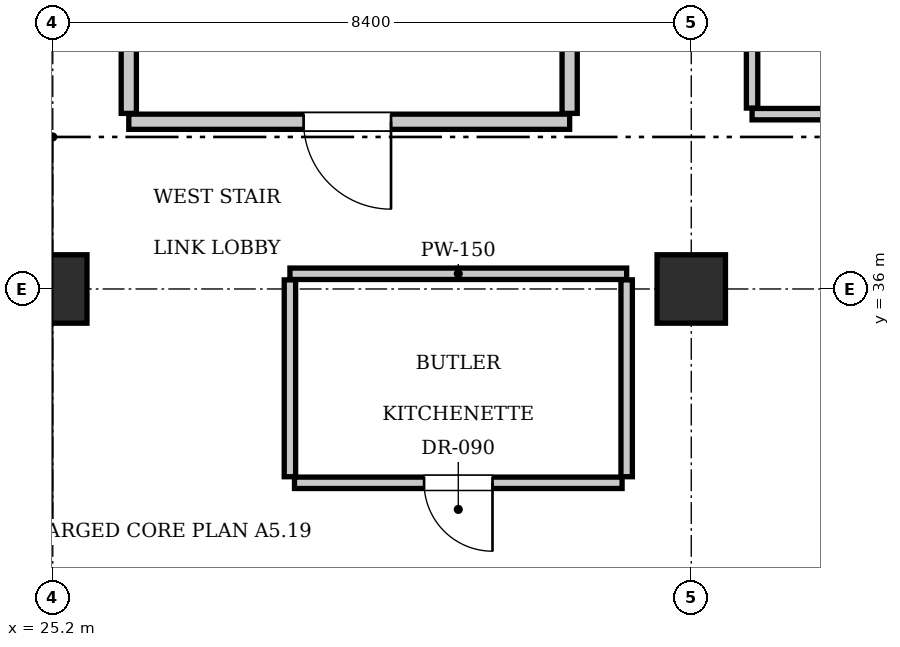
"""IFC4 building model, lengths in metres.
Left out: names, types, materials, properties, quantities, classifications, styles, units other than length and angle.
Written with IfcOpenShell. Run it as: python <this file> out.ifc"""

import sys

from ifc_helpers import new_model, si_unit, direction, frame, frame_2d, origin, origin_2d, place, context, subcontext, project, spatial, rectangle, extrude, element, fill, save


model = new_model("IFC4")
c1 = context("Model", 3, precision=1e-05, world=origin(), true_north=direction((0.0, 1.0)))
c2 = subcontext(c1, "Body", "Model", "MODEL_VIEW")
j1 = project(units=[si_unit("LENGTHUNIT", "METRE"), si_unit("PLANEANGLEUNIT", "RADIAN")], contexts=[c1])
p1 = place(None, origin())
s1 = spatial("IfcSite", under=j1, at=p1, CompositionType="ELEMENT")
p2 = place(p1, origin())
s2 = spatial("IfcBuilding", under=s1, at=p2, CompositionType="ELEMENT")
p3 = place(p2, frame((0.0, 0.0, 135.1)))
s3 = spatial("IfcBuildingStorey", under=s2, at=p3, CompositionType="ELEMENT", Elevation=135.1)
for number, where, z_axis, x_axis in (
    (1, (25.2, 36.0, 0.0), (0.0, 0.0, 1.0), (1.0, 0.0, 0.0)),
    (2, (33.6, 36.0, 0.0), (0.0, 0.0, 1.0), (1.0, 0.0, 0.0)),
):
    element("IfcColumn", number, at=place(p3, frame(where, z_axis=z_axis, x_axis=x_axis)), inside=s3, PredefinedType="COLUMN", context=c2, shape_type="SweptSolid", body=[
        extrude(rectangle(XDim=0.9, YDim=0.9, at=origin_2d()), origin(), (0.0, 0.0, 1.0), 3.85),
    ])
p4 = place(p3, frame((26.2, 38.2, 0.0), z_axis=(0.0, 0.0, 1.0), x_axis=(1.0, 0.0, 0.0)))
e3 = element("IfcWall", 3, at=p4, inside=s3, PredefinedType="PARTITIONING", context=c2, shape_type="SweptSolid", body=[
    extrude(rectangle(XDim=5.8, YDim=0.2, at=frame_2d((2.9, 0.0))), origin(), (0.0, 0.0, 1.0), 3.61),
])
p5 = place(p4, frame((2.3, 0.0, 0.0)))
e4 = element("IfcOpeningElement", 4, at=p5, cuts=e3, PredefinedType="OPENING", context=c2, shape_type="SweptSolid", body=[
    extrude(rectangle(XDim=1.15, YDim=2.15, at=frame_2d((0.575, 1.075))), frame((0.0, 0.11, 0.0), z_axis=(0.0, -1.0, 0.0), x_axis=(1.0, 0.0, 0.0)), (0.0, 0.0, 1.0), 0.22),
])
for number, where, z_axis, x_axis in (
    (5, (26.2, 38.31, 0.0), (0.0, 0.0, 1.0), (0.0, 1.0, 0.0)),
    (6, (32.0, 38.31, 0.0), (0.0, 0.0, 1.0), (0.0, 1.0, 0.0)),
):
    element("IfcWall", number, at=place(p3, frame(where, z_axis=z_axis, x_axis=x_axis)), inside=s3, PredefinedType="PARTITIONING", context=c2, shape_type="SweptSolid", body=[
        extrude(rectangle(XDim=3.07, YDim=0.2, at=frame_2d((1.535, 0.0))), origin(), (0.0, 0.0, 1.0), 3.61),
    ])
p6 = place(p3, frame((34.4, 38.3, 0.0), z_axis=(0.0, 0.0, 1.0), x_axis=(1.0, 0.0, 0.0)))
e7 = element("IfcWall", 7, at=p6, inside=s3, PredefinedType="PARTITIONING", context=c2, shape_type="SweptSolid", body=[
    extrude(rectangle(XDim=2.88, YDim=0.15, at=frame_2d((1.44, 0.0))), origin(), (0.0, 0.0, 1.0), 3.61),
])
p7 = place(p6, frame((1.0, 0.0, 0.0)))
e8 = element("IfcOpeningElement", 8, at=p7, cuts=e7, PredefinedType="OPENING", context=c2, shape_type="SweptSolid", body=[
    extrude(rectangle(XDim=0.8, YDim=2.05, at=frame_2d((0.4, 1.025))), frame((0.0, 0.085, 0.0), z_axis=(0.0, -1.0, 0.0), x_axis=(1.0, 0.0, 0.0)), (0.0, 0.0, 1.0), 0.17),
])
p8 = place(p3, frame((34.4, 38.38, 0.0), z_axis=(0.0, 0.0, 1.0), x_axis=(0.0, 1.0, 0.0)))
e9 = element("IfcWall", 9, at=p8, inside=s3, PredefinedType="PARTITIONING", context=c2, shape_type="SweptSolid", body=[
    extrude(rectangle(XDim=2.84, YDim=0.15, at=frame_2d((1.42, 0.0))), origin(), (0.0, 0.0, 1.0), 3.61),
])
p9 = place(p3, frame((28.32, 36.2, 0.0), z_axis=(0.0, 0.0, 1.0), x_axis=(1.0, 0.0, 0.0)))
e10 = element("IfcWall", 10, at=p9, inside=s3, PredefinedType="PARTITIONING", context=c2, shape_type="SweptSolid", body=[
    extrude(rectangle(XDim=4.43, YDim=0.15, at=frame_2d((2.215, 0.0))), origin(), (0.0, 0.0, 1.0), 3.61),
])
for number, where, z_axis, x_axis in (
    (11, (28.32, 33.53, 0.0), (0.0, 0.0, 1.0), (0.0, 1.0, 0.0)),
    (12, (32.75, 33.53, 0.0), (0.0, 0.0, 1.0), (0.0, 1.0, 0.0)),
):
    element("IfcWall", number, at=place(p3, frame(where, z_axis=z_axis, x_axis=x_axis)), inside=s3, PredefinedType="PARTITIONING", context=c2, shape_type="SweptSolid", body=[
        extrude(rectangle(XDim=2.59, YDim=0.15, at=frame_2d((1.295, 0.0))), origin(), (0.0, 0.0, 1.0), 3.61),
    ])
p10 = place(p3, frame((28.38, 33.45, 0.0), z_axis=(0.0, 0.0, 1.0), x_axis=(1.0, 0.0, 0.0)))
e13 = element("IfcWall", 13, at=p10, inside=s3, PredefinedType="PARTITIONING", context=c2, shape_type="SweptSolid", body=[
    extrude(rectangle(XDim=4.31, YDim=0.15, at=frame_2d((2.155, 0.0))), origin(), (0.0, 0.0, 1.0), 3.61),
])
p11 = place(p10, frame((1.705, 0.0, 0.0)))
e14 = element("IfcOpeningElement", 14, at=p11, cuts=e13, PredefinedType="OPENING", context=c2, shape_type="SweptSolid", body=[
    extrude(rectangle(XDim=0.9, YDim=2.1, at=frame_2d((0.45, 1.05))), frame((0.0, 0.085, 0.0), z_axis=(0.0, -1.0, 0.0), x_axis=(1.0, 0.0, 0.0)), (0.0, 0.0, 1.0), 0.17),
])
p12 = place(p5, frame((1.15, 0.0, 0.0), z_axis=(0.0, 0.0, 1.0), x_axis=(-1.0, 0.0, 0.0)))
e15 = element("IfcDoor", 15, at=p12, inside=s3, OperationType="SINGLE_SWING_LEFT", PredefinedType="DOOR", context=c2, shape_type="SweptSolid", body=[
    extrude(rectangle(XDim=1.15, YDim=2.15, at=frame_2d((0.575, 1.075))), frame((0.0, 0.025, 0.0), z_axis=(0.0, -1.0, 0.0), x_axis=(1.0, 0.0, 0.0)), (0.0, 0.0, 1.0), 0.05),
])
fill(e4, e15)
p13 = place(p11, frame((0.9, 0.0, 0.0), z_axis=(0.0, 0.0, 1.0), x_axis=(-1.0, 0.0, 0.0)))
e16 = element("IfcDoor", 16, at=p13, inside=s3, OperationType="SINGLE_SWING_LEFT", PredefinedType="DOOR", context=c2, shape_type="SweptSolid", body=[
    extrude(rectangle(XDim=0.9, YDim=2.1, at=frame_2d((0.45, 1.05))), frame((0.0, 0.025, 0.0), z_axis=(0.0, -1.0, 0.0), x_axis=(1.0, 0.0, 0.0)), (0.0, 0.0, 1.0), 0.05),
])
fill(e14, e16)
save(model, sys.argv[1])
